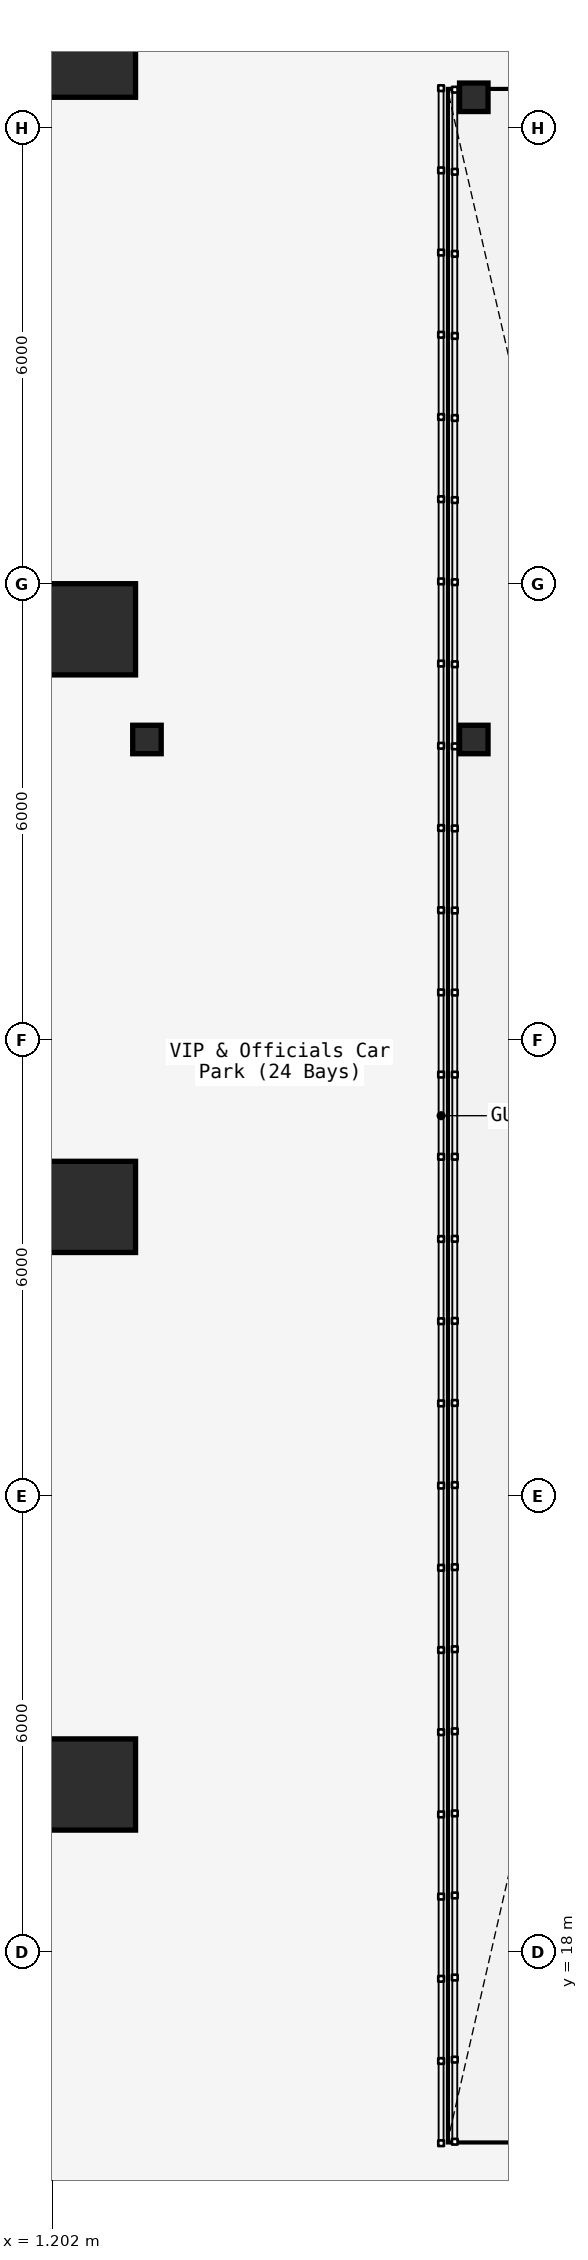
"""IFC4 building model, lengths in metres.
Left out: names, types, materials, properties, quantities, classifications, styles, units other than length and angle.
Written with IfcOpenShell. Run it as: python <this file> out.ifc"""

import sys

from ifc_helpers import new_model, si_unit, direction, frame, origin, origin_2d, place, context, subcontext, project, spatial, rectangle, i_section, extrude, element, save


model = new_model("IFC4")
c1 = context("Model", 3, precision=1e-05, world=origin(), true_north=direction((0.0, 1.0)))
c2 = subcontext(c1, "Body", "Model", "MODEL_VIEW")
j1 = project(units=[si_unit("LENGTHUNIT", "METRE"), si_unit("PLANEANGLEUNIT", "RADIAN")], contexts=[c1])
p1 = place(None, origin())
s1 = spatial("IfcSite", under=j1, at=p1, CompositionType="ELEMENT")
p2 = place(p1, origin())
s2 = spatial("IfcBuilding", under=s1, at=p2, CompositionType="ELEMENT")
p3 = place(p2, frame((0.0, 0.0, -4.5)))
s3 = spatial("IfcBuildingStorey", under=s2, at=p3, CompositionType="ELEMENT", Elevation=-4.5)
for number, where, z_axis, x_axis in (
    (1, (1.7, 20.2, 0.0), (0.0, 0.0, 1.0), (1.0, 0.0, 0.0)),
    (2, (1.7, 27.8, 0.0), (0.0, 0.0, 1.0), (1.0, 0.0, 0.0)),
    (3, (1.7, 35.4, 0.0), (0.0, 0.0, 1.0), (1.0, 0.0, 0.0)),
    (4, (1.7, 43.0, 0.0), (0.0, 0.0, 1.0), (1.0, 0.0, 0.0)),
):
    element("IfcColumn", number, at=place(p3, frame(where, z_axis=z_axis, x_axis=x_axis)), inside=s3, PredefinedType="COLUMN", context=c2, shape_type="SweptSolid", body=[
        extrude(rectangle(XDim=1.2, YDim=1.2, at=origin_2d()), origin(), (0.0, 0.0, 1.0), 4.1),
    ])
for number, where, z_axis, x_axis in (
    (5, (2.45, 33.95, 0.0), (0.0, 0.0, 1.0), (1.0, 0.0, 0.0)),
    (6, (6.75, 33.95, 0.0), (0.0, 0.0, 1.0), (1.0, 0.0, 0.0)),
    (7, (6.75, 42.4, 0.0), (0.0, 0.0, 1.0), (1.0, 0.0, 0.0)),
):
    element("IfcColumn", number, at=place(p3, frame(where, z_axis=z_axis, x_axis=x_axis)), inside=s3, PredefinedType="COLUMN", context=c2, shape_type="SweptSolid", body=[
        extrude(i_section(OverallWidth=0.375, OverallDepth=0.375, WebThickness=0.017, FlangeThickness=0.027, FilletRadius=0.015, at=origin_2d()), origin(), (0.0, 0.0, 1.0), 4.5),
    ])
save(model, sys.argv[1])
